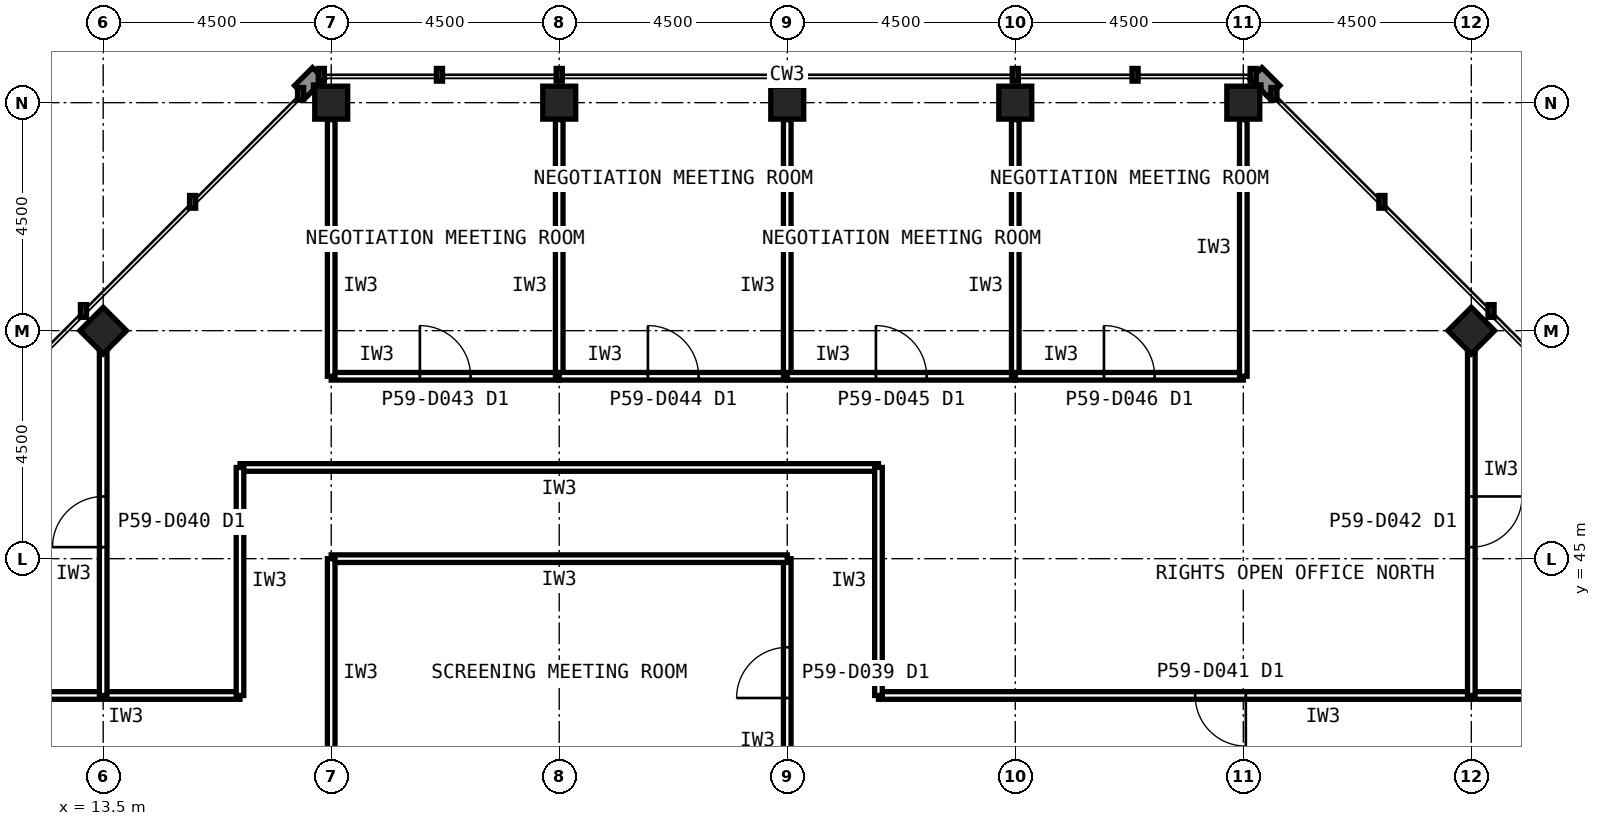
"""IFC4 building model, lengths in metres.
Left out: names, types, materials, properties, quantities, classifications, styles, units other than length and angle.
Written with IfcOpenShell. Run it as: python <this file> out.ifc"""

import sys

from ifc_helpers import new_model, si_unit, direction, frame, frame_2d, origin, origin_2d, place, context, subcontext, project, spatial, rectangle, hollow_rectangle, extrude, element, fill, save


model = new_model("IFC4")
c1 = context("Model", 3, precision=1e-05, world=origin(), true_north=direction((0.0, 1.0)))
c2 = subcontext(c1, "Body", "Model", "MODEL_VIEW")
j1 = project(units=[si_unit("LENGTHUNIT", "METRE"), si_unit("PLANEANGLEUNIT", "RADIAN")], contexts=[c1])
p1 = place(None, origin())
s1 = spatial("IfcSite", under=j1, at=p1, CompositionType="ELEMENT")
p2 = place(p1, origin())
s2 = spatial("IfcBuilding", under=s1, at=p2, CompositionType="ELEMENT")
p3 = place(p2, frame((0.0, 0.0, 246.6)))
s3 = spatial("IfcBuildingStorey", under=s2, at=p3, CompositionType="ELEMENT", Elevation=246.6)
for number, where, z_axis, x_axis in (
    (1, (36.0, 54.0, 0.0), (0.0, 0.0, 1.0), (1.0, 0.0, 0.0)),
    (2, (31.5, 54.0, 0.0), (0.0, 0.0, 1.0), (1.0, 0.0, 0.0)),
    (3, (27.0, 54.0, 0.0), (0.0, 0.0, 1.0), (1.0, 0.0, 0.0)),
    (4, (22.5, 54.0, 0.0), (0.0, 0.0, 1.0), (1.0, 0.0, 0.0)),
    (5, (18.0, 54.0, 0.0), (0.0, 0.0, 1.0), (1.0, 0.0, 0.0)),
    (6, (40.5, 49.5, 0.0), (0.0, 0.0, 1.0), (0.707, 0.707, 0.0)),
    (7, (13.5, 49.5, 0.0), (0.0, 0.0, 1.0), (0.707, 0.707, 0.0)),
):
    element("IfcColumn", number, at=place(p3, frame(where, z_axis=z_axis, x_axis=x_axis)), inside=s3, PredefinedType="COLUMN", context=c2, shape_type="SweptSolid", body=[
        extrude(hollow_rectangle(XDim=0.65, YDim=0.65, WallThickness=0.032, at=origin_2d()), origin(), (0.0, 0.0, 1.0), 4.0),
    ])
p4 = place(p3, frame((42.3, 42.3, 0.0), z_axis=(0.0, 0.0, 1.0), x_axis=(-1.0, 0.0, 0.0)))
e8 = element("IfcWall", 8, at=p4, inside=s3, PredefinedType="PARTITIONING", context=c2, shape_type="SweptSolid", body=[
    extrude(rectangle(XDim=13.5, YDim=0.15, at=frame_2d((6.75, 0.0))), origin(), (0.0, 0.0, 1.0), 3.84),
])
p5 = place(p4, frame((6.25, 0.0, 0.0)))
e9 = element("IfcOpeningElement", 9, at=p5, cuts=e8, PredefinedType="OPENING", context=c2, shape_type="SweptSolid", body=[
    extrude(rectangle(XDim=1.0, YDim=2.1, at=frame_2d((0.5, 1.05))), frame((0.0, 0.085, 0.0), z_axis=(0.0, -1.0, 0.0), x_axis=(1.0, 0.0, 0.0)), (0.0, 0.0, 1.0), 0.17),
])
p6 = place(p3, frame((28.8, 46.8, 0.0), z_axis=(0.0, 0.0, 1.0), x_axis=(-1.0, 0.0, 0.0)))
e10 = element("IfcWall", 10, at=p6, inside=s3, PredefinedType="PARTITIONING", context=c2, shape_type="SweptSolid", body=[
    extrude(rectangle(XDim=12.6, YDim=0.15, at=frame_2d((6.3, 0.0))), origin(), (0.0, 0.0, 1.0), 3.84),
])
for number, where, z_axis, x_axis in (
    (11, (16.2, 42.3, 0.0), (0.0, 0.0, 1.0), (-1.0, 0.0, 0.0)),
    (12, (16.2, 46.8, 0.0), (0.0, 0.0, 1.0), (0.0, -1.0, 0.0)),
    (13, (28.8, 42.3, 0.0), (0.0, 0.0, 1.0), (0.0, 1.0, 0.0)),
):
    element("IfcWall", number, at=place(p3, frame(where, z_axis=z_axis, x_axis=x_axis)), inside=s3, PredefinedType="PARTITIONING", context=c2, shape_type="SweptSolid", body=[
        extrude(rectangle(XDim=4.5, YDim=0.15, at=frame_2d((2.25, 0.0))), origin(), (0.0, 0.0, 1.0), 3.84),
    ])
p7 = place(p3, frame((27.0, 40.5, 0.0), z_axis=(0.0, 0.0, 1.0), x_axis=(0.0, 1.0, 0.0)))
e14 = element("IfcWall", 14, at=p7, inside=s3, PredefinedType="PARTITIONING", context=c2, shape_type="SweptSolid", body=[
    extrude(rectangle(XDim=4.5, YDim=0.15, at=frame_2d((2.25, 0.0))), origin(), (0.0, 0.0, 1.0), 2.989),
])
p8 = place(p7, frame((1.75, 0.0, 0.0)))
e15 = element("IfcOpeningElement", 15, at=p8, cuts=e14, PredefinedType="OPENING", context=c2, shape_type="SweptSolid", body=[
    extrude(rectangle(XDim=1.0, YDim=2.1, at=frame_2d((0.5, 1.05))), frame((0.0, 0.085, 0.0), z_axis=(0.0, -1.0, 0.0), x_axis=(1.0, 0.0, 0.0)), (0.0, 0.0, 1.0), 0.17),
])
p9 = place(p3, frame((27.0, 45.0, 0.0), z_axis=(0.0, 0.0, 1.0), x_axis=(-1.0, 0.0, 0.0)))
e16 = element("IfcWall", 16, at=p9, inside=s3, PredefinedType="PARTITIONING", context=c2, shape_type="SweptSolid", body=[
    extrude(rectangle(XDim=9.0, YDim=0.15, at=frame_2d((4.5, 0.0))), origin(), (0.0, 0.0, 1.0), 3.84),
])
p10 = place(p3, frame((18.0, 45.0, 0.0), z_axis=(0.0, 0.0, 1.0), x_axis=(0.0, -1.0, 0.0)))
e17 = element("IfcWall", 17, at=p10, inside=s3, PredefinedType="PARTITIONING", context=c2, shape_type="SweptSolid", body=[
    extrude(rectangle(XDim=4.5, YDim=0.15, at=frame_2d((2.25, 0.0))), origin(), (0.0, 0.0, 1.0), 2.989),
])
p11 = place(p3, frame((18.0, 48.6, 0.0), z_axis=(0.0, 0.0, 1.0), x_axis=(1.0, 0.0, 0.0)))
e18 = element("IfcWall", 18, at=p11, inside=s3, PredefinedType="PARTITIONING", context=c2, shape_type="SweptSolid", body=[
    extrude(rectangle(XDim=4.5, YDim=0.15, at=frame_2d((2.25, 0.0))), origin(), (0.0, 0.0, 1.0), 3.84),
])
p12 = place(p11, frame((1.75, 0.0, 0.0)))
e19 = element("IfcOpeningElement", 19, at=p12, cuts=e18, PredefinedType="OPENING", context=c2, shape_type="SweptSolid", body=[
    extrude(rectangle(XDim=1.0, YDim=2.1, at=frame_2d((0.5, 1.05))), frame((0.0, 0.085, 0.0), z_axis=(0.0, -1.0, 0.0), x_axis=(1.0, 0.0, 0.0)), (0.0, 0.0, 1.0), 0.17),
])
for number, where, z_axis, x_axis in (
    (20, (22.5, 48.6, 0.0), (0.0, 0.0, 1.0), (0.0, 1.0, 0.0)),
    (21, (18.0, 53.665, 0.0), (0.0, 0.0, 1.0), (0.0, -1.0, 0.0)),
):
    element("IfcWall", number, at=place(p3, frame(where, z_axis=z_axis, x_axis=x_axis)), inside=s3, PredefinedType="PARTITIONING", context=c2, shape_type="SweptSolid", body=[
        extrude(rectangle(XDim=5.065, YDim=0.15, at=frame_2d((2.532, 0.0))), origin(), (0.0, 0.0, 1.0), 2.989),
    ])
p13 = place(p3, frame((22.5, 48.6, 0.0), z_axis=(0.0, 0.0, 1.0), x_axis=(1.0, 0.0, 0.0)))
e22 = element("IfcWall", 22, at=p13, inside=s3, PredefinedType="PARTITIONING", context=c2, shape_type="SweptSolid", body=[
    extrude(rectangle(XDim=4.5, YDim=0.15, at=frame_2d((2.25, 0.0))), origin(), (0.0, 0.0, 1.0), 3.84),
])
p14 = place(p13, frame((1.75, 0.0, 0.0)))
e23 = element("IfcOpeningElement", 23, at=p14, cuts=e22, PredefinedType="OPENING", context=c2, shape_type="SweptSolid", body=[
    extrude(rectangle(XDim=1.0, YDim=2.1, at=frame_2d((0.5, 1.05))), frame((0.0, 0.085, 0.0), z_axis=(0.0, -1.0, 0.0), x_axis=(1.0, 0.0, 0.0)), (0.0, 0.0, 1.0), 0.17),
])
p15 = place(p3, frame((27.0, 48.6, 0.0), z_axis=(0.0, 0.0, 1.0), x_axis=(0.0, 1.0, 0.0)))
e24 = element("IfcWall", 24, at=p15, inside=s3, PredefinedType="PARTITIONING", context=c2, shape_type="SweptSolid", body=[
    extrude(rectangle(XDim=5.065, YDim=0.15, at=frame_2d((2.532, 0.0))), origin(), (0.0, 0.0, 1.0), 2.989),
])
p16 = place(p3, frame((27.0, 48.6, 0.0), z_axis=(0.0, 0.0, 1.0), x_axis=(1.0, 0.0, 0.0)))
e25 = element("IfcWall", 25, at=p16, inside=s3, PredefinedType="PARTITIONING", context=c2, shape_type="SweptSolid", body=[
    extrude(rectangle(XDim=4.5, YDim=0.15, at=frame_2d((2.25, 0.0))), origin(), (0.0, 0.0, 1.0), 3.84),
])
p17 = place(p16, frame((1.75, 0.0, 0.0)))
e26 = element("IfcOpeningElement", 26, at=p17, cuts=e25, PredefinedType="OPENING", context=c2, shape_type="SweptSolid", body=[
    extrude(rectangle(XDim=1.0, YDim=2.1, at=frame_2d((0.5, 1.05))), frame((0.0, 0.085, 0.0), z_axis=(0.0, -1.0, 0.0), x_axis=(1.0, 0.0, 0.0)), (0.0, 0.0, 1.0), 0.17),
])
p18 = place(p3, frame((31.5, 48.6, 0.0), z_axis=(0.0, 0.0, 1.0), x_axis=(0.0, 1.0, 0.0)))
e27 = element("IfcWall", 27, at=p18, inside=s3, PredefinedType="PARTITIONING", context=c2, shape_type="SweptSolid", body=[
    extrude(rectangle(XDim=5.065, YDim=0.15, at=frame_2d((2.532, 0.0))), origin(), (0.0, 0.0, 1.0), 2.989),
])
p19 = place(p3, frame((31.5, 48.6, 0.0), z_axis=(0.0, 0.0, 1.0), x_axis=(1.0, 0.0, 0.0)))
e28 = element("IfcWall", 28, at=p19, inside=s3, PredefinedType="PARTITIONING", context=c2, shape_type="SweptSolid", body=[
    extrude(rectangle(XDim=4.5, YDim=0.15, at=frame_2d((2.25, 0.0))), origin(), (0.0, 0.0, 1.0), 3.84),
])
p20 = place(p19, frame((1.75, 0.0, 0.0)))
e29 = element("IfcOpeningElement", 29, at=p20, cuts=e28, PredefinedType="OPENING", context=c2, shape_type="SweptSolid", body=[
    extrude(rectangle(XDim=1.0, YDim=2.1, at=frame_2d((0.5, 1.05))), frame((0.0, 0.085, 0.0), z_axis=(0.0, -1.0, 0.0), x_axis=(1.0, 0.0, 0.0)), (0.0, 0.0, 1.0), 0.17),
])
p21 = place(p3, frame((36.0, 48.6, 0.0), z_axis=(0.0, 0.0, 1.0), x_axis=(0.0, 1.0, 0.0)))
e30 = element("IfcWall", 30, at=p21, inside=s3, PredefinedType="PARTITIONING", context=c2, shape_type="SweptSolid", body=[
    extrude(rectangle(XDim=5.065, YDim=0.15, at=frame_2d((2.532, 0.0))), origin(), (0.0, 0.0, 1.0), 2.989),
])
p22 = place(p3, frame((40.5, 49.155, 0.0), z_axis=(0.0, 0.0, 1.0), x_axis=(0.0, -1.0, 0.0)))
e31 = element("IfcWall", 31, at=p22, inside=s3, PredefinedType="PARTITIONING", context=c2, shape_type="SweptSolid", body=[
    extrude(rectangle(XDim=6.855, YDim=0.15, at=frame_2d((3.427, 0.0))), origin(), (0.0, 0.0, 1.0), 2.989),
])
p23 = place(p22, frame((2.927, 0.0, 0.0)))
e32 = element("IfcOpeningElement", 32, at=p23, cuts=e31, PredefinedType="OPENING", context=c2, shape_type="SweptSolid", body=[
    extrude(rectangle(XDim=1.0, YDim=2.1, at=frame_2d((0.5, 1.05))), frame((0.0, 0.085, 0.0), z_axis=(0.0, -1.0, 0.0), x_axis=(1.0, 0.0, 0.0)), (0.0, 0.0, 1.0), 0.17),
])
p24 = place(p3, frame((13.5, 42.3, 0.0), z_axis=(0.0, 0.0, 1.0), x_axis=(0.0, 1.0, 0.0)))
e33 = element("IfcWall", 33, at=p24, inside=s3, PredefinedType="PARTITIONING", context=c2, shape_type="SweptSolid", body=[
    extrude(rectangle(XDim=6.855, YDim=0.15, at=frame_2d((3.427, 0.0))), origin(), (0.0, 0.0, 1.0), 2.989),
])
p25 = place(p24, frame((2.927, 0.0, 0.0)))
e34 = element("IfcOpeningElement", 34, at=p25, cuts=e33, PredefinedType="OPENING", context=c2, shape_type="SweptSolid", body=[
    extrude(rectangle(XDim=1.0, YDim=2.1, at=frame_2d((0.5, 1.05))), frame((0.0, 0.085, 0.0), z_axis=(0.0, -1.0, 0.0), x_axis=(1.0, 0.0, 0.0)), (0.0, 0.0, 1.0), 0.17),
])
p26 = place(p5, origin())
e35 = element("IfcDoor", 35, at=p26, inside=s3, OperationType="SINGLE_SWING_LEFT", PredefinedType="DOOR", context=c2, shape_type="SweptSolid", body=[
    extrude(rectangle(XDim=1.0, YDim=2.1, at=frame_2d((0.5, 1.05))), frame((0.0, 0.025, 0.0), z_axis=(0.0, -1.0, 0.0), x_axis=(1.0, 0.0, 0.0)), (0.0, 0.0, 1.0), 0.05),
])
fill(e9, e35)
p27 = place(p8, origin())
e36 = element("IfcDoor", 36, at=p27, inside=s3, OperationType="SINGLE_SWING_LEFT", PredefinedType="DOOR", context=c2, shape_type="SweptSolid", body=[
    extrude(rectangle(XDim=1.0, YDim=2.1, at=frame_2d((0.5, 1.05))), frame((0.0, 0.025, 0.0), z_axis=(0.0, -1.0, 0.0), x_axis=(1.0, 0.0, 0.0)), (0.0, 0.0, 1.0), 0.05),
])
fill(e15, e36)
p28 = place(p12, origin())
e37 = element("IfcDoor", 37, at=p28, inside=s3, OperationType="SINGLE_SWING_LEFT", PredefinedType="DOOR", context=c2, shape_type="SweptSolid", body=[
    extrude(rectangle(XDim=1.0, YDim=2.1, at=frame_2d((0.5, 1.05))), frame((0.0, 0.025, 0.0), z_axis=(0.0, -1.0, 0.0), x_axis=(1.0, 0.0, 0.0)), (0.0, 0.0, 1.0), 0.05),
])
fill(e19, e37)
p29 = place(p14, origin())
e38 = element("IfcDoor", 38, at=p29, inside=s3, OperationType="SINGLE_SWING_LEFT", PredefinedType="DOOR", context=c2, shape_type="SweptSolid", body=[
    extrude(rectangle(XDim=1.0, YDim=2.1, at=frame_2d((0.5, 1.05))), frame((0.0, 0.025, 0.0), z_axis=(0.0, -1.0, 0.0), x_axis=(1.0, 0.0, 0.0)), (0.0, 0.0, 1.0), 0.05),
])
fill(e23, e38)
p30 = place(p17, origin())
e39 = element("IfcDoor", 39, at=p30, inside=s3, OperationType="SINGLE_SWING_LEFT", PredefinedType="DOOR", context=c2, shape_type="SweptSolid", body=[
    extrude(rectangle(XDim=1.0, YDim=2.1, at=frame_2d((0.5, 1.05))), frame((0.0, 0.025, 0.0), z_axis=(0.0, -1.0, 0.0), x_axis=(1.0, 0.0, 0.0)), (0.0, 0.0, 1.0), 0.05),
])
fill(e26, e39)
p31 = place(p20, origin())
e40 = element("IfcDoor", 40, at=p31, inside=s3, OperationType="SINGLE_SWING_LEFT", PredefinedType="DOOR", context=c2, shape_type="SweptSolid", body=[
    extrude(rectangle(XDim=1.0, YDim=2.1, at=frame_2d((0.5, 1.05))), frame((0.0, 0.025, 0.0), z_axis=(0.0, -1.0, 0.0), x_axis=(1.0, 0.0, 0.0)), (0.0, 0.0, 1.0), 0.05),
])
fill(e29, e40)
p32 = place(p23, origin())
e41 = element("IfcDoor", 41, at=p32, inside=s3, OperationType="SINGLE_SWING_LEFT", PredefinedType="DOOR", context=c2, shape_type="SweptSolid", body=[
    extrude(rectangle(XDim=1.0, YDim=2.1, at=frame_2d((0.5, 1.05))), frame((0.0, 0.025, 0.0), z_axis=(0.0, -1.0, 0.0), x_axis=(1.0, 0.0, 0.0)), (0.0, 0.0, 1.0), 0.05),
])
fill(e32, e41)
p33 = place(p25, origin())
e42 = element("IfcDoor", 42, at=p33, inside=s3, OperationType="SINGLE_SWING_LEFT", PredefinedType="DOOR", context=c2, shape_type="SweptSolid", body=[
    extrude(rectangle(XDim=1.0, YDim=2.1, at=frame_2d((0.5, 1.05))), frame((0.0, 0.025, 0.0), z_axis=(0.0, -1.0, 0.0), x_axis=(1.0, 0.0, 0.0)), (0.0, 0.0, 1.0), 0.05),
])
fill(e34, e42)
save(model, sys.argv[1])
